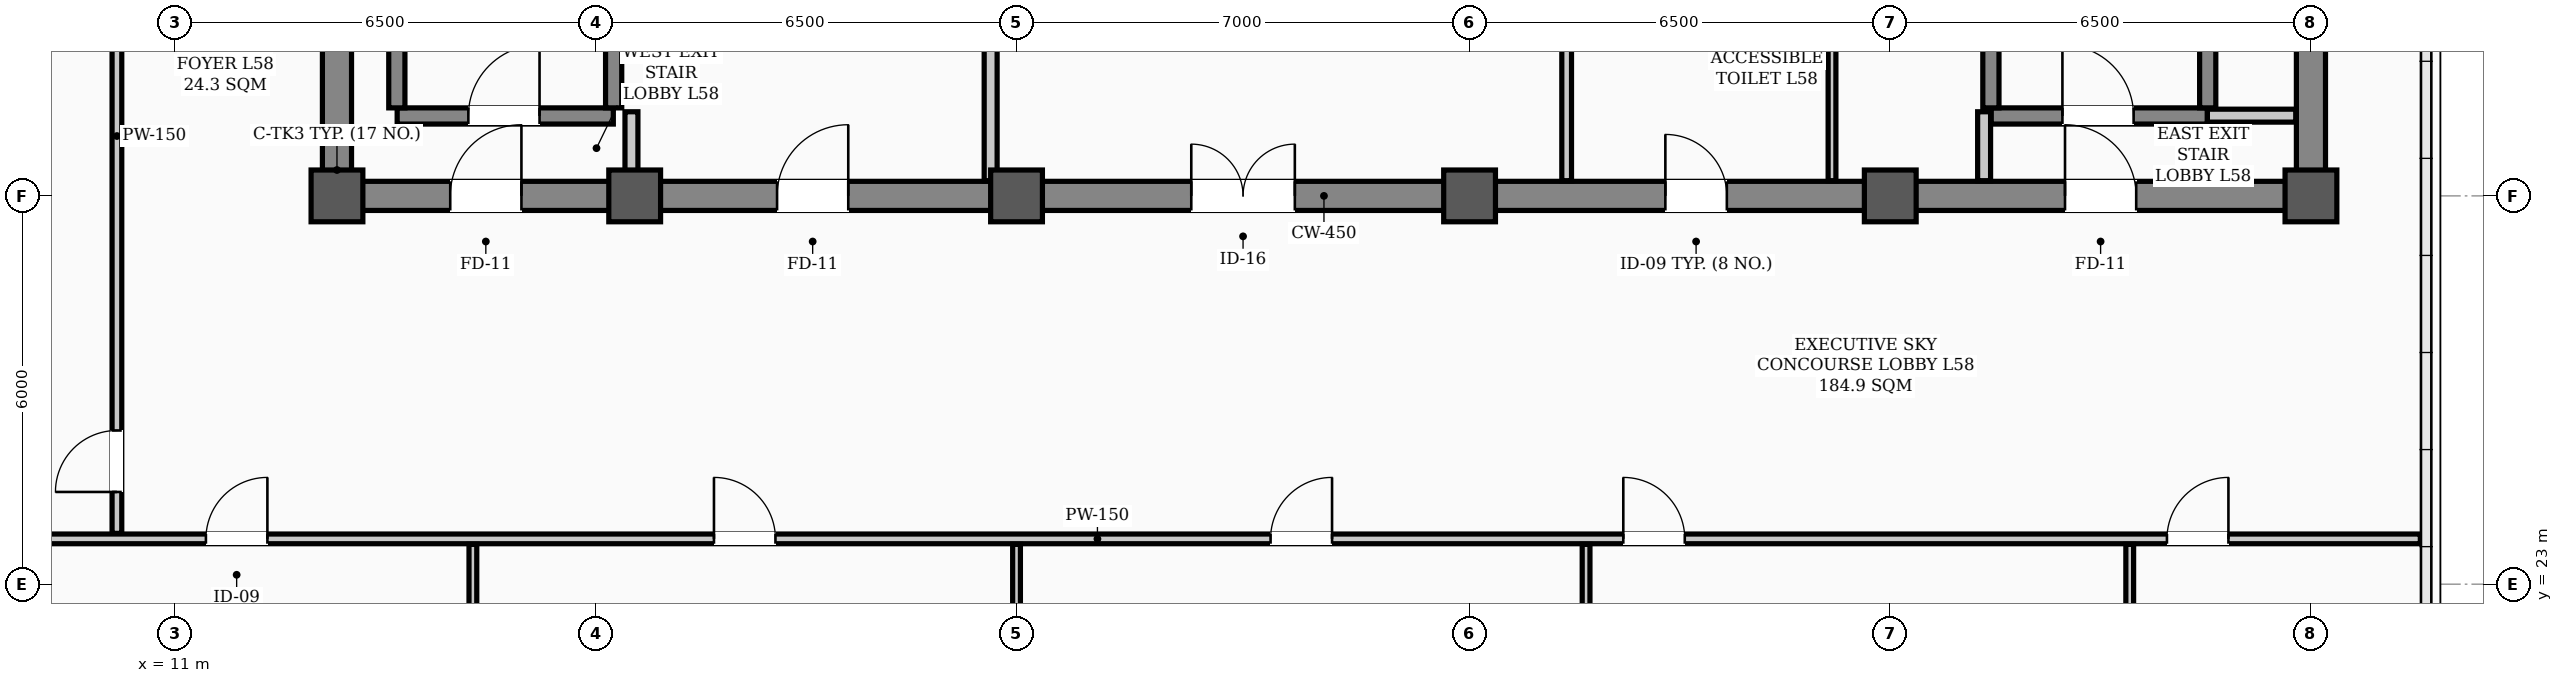
"""IFC4 building model, lengths in metres.
Left out: names, types, materials, properties, quantities, classifications, styles, units other than length and angle.
Written with IfcOpenShell. Run it as: python <this file> out.ifc"""

import sys

from ifc_helpers import new_model, si_unit, direction, frame, frame_2d, origin, origin_2d, place, context, subcontext, project, spatial, rectangle, hollow_rectangle, extrude, element, fill, save


model = new_model("IFC4")
c1 = context("Model", 3, precision=1e-05, world=origin(), true_north=direction((0.0, 1.0)))
c2 = subcontext(c1, "Body", "Model", "MODEL_VIEW")
j1 = project(units=[si_unit("LENGTHUNIT", "METRE"), si_unit("PLANEANGLEUNIT", "RADIAN")], contexts=[c1])
p1 = place(None, origin())
s1 = spatial("IfcSite", under=j1, at=p1, CompositionType="ELEMENT")
p2 = place(p1, origin())
s2 = spatial("IfcBuilding", under=s1, at=p2, CompositionType="ELEMENT")
p3 = place(p2, frame((0.0, 0.0, 234.5)))
s3 = spatial("IfcBuildingStorey", under=s2, at=p3, CompositionType="ELEMENT", Elevation=234.5)
for number, where, z_axis, x_axis in (
    (1, (13.5, 29.0, 0.0), (0.0, 0.0, 1.0), (1.0, 0.0, 0.0)),
    (2, (18.1, 29.0, 0.0), (0.0, 0.0, 1.0), (1.0, 0.0, 0.0)),
    (3, (24.0, 29.0, 0.0), (0.0, 0.0, 1.0), (1.0, 0.0, 0.0)),
    (4, (31.0, 29.0, 0.0), (0.0, 0.0, 1.0), (1.0, 0.0, 0.0)),
    (5, (37.5, 29.0, 0.0), (0.0, 0.0, 1.0), (1.0, 0.0, 0.0)),
    (6, (44.0, 29.0, 0.0), (0.0, 0.0, 1.0), (1.0, 0.0, 0.0)),
):
    element("IfcColumn", number, at=place(p3, frame(where, z_axis=z_axis, x_axis=x_axis)), inside=s3, PredefinedType="COLUMN", context=c2, shape_type="SweptSolid", body=[
        extrude(hollow_rectangle(XDim=0.8, YDim=0.8, WallThickness=0.032, InnerFilletRadius=0.016, OuterFilletRadius=0.048, at=origin_2d()), origin(), (0.0, 0.0, 1.0), 3.9),
    ])
p4 = place(p3, frame((13.5, 29.0, 0.0), z_axis=(0.0, 0.0, 1.0), x_axis=(1.0, 0.0, 0.0)))
e7 = element("IfcWall", 7, at=p4, inside=s3, PredefinedType="SHEAR", context=c2, shape_type="SweptSolid", body=[
    extrude(rectangle(XDim=30.5, YDim=0.45, at=frame_2d((15.25, 0.0))), origin(), (0.0, 0.0, 1.0), 3.72),
])
p5 = place(p4, frame((1.75, 0.0, 0.0)))
e8 = element("IfcOpeningElement", 8, at=p5, cuts=e7, PredefinedType="OPENING", context=c2, shape_type="SweptSolid", body=[
    extrude(rectangle(XDim=1.1, YDim=2.08, at=frame_2d((0.55, 1.04))), frame((0.0, 0.235, 0.0), z_axis=(0.0, -1.0, 0.0), x_axis=(1.0, 0.0, 0.0)), (0.0, 0.0, 1.0), 0.47),
])
p6 = place(p4, frame((26.7, 0.0, 0.0)))
e9 = element("IfcOpeningElement", 9, at=p6, cuts=e7, PredefinedType="OPENING", context=c2, shape_type="SweptSolid", body=[
    extrude(rectangle(XDim=1.1, YDim=2.08, at=frame_2d((0.55, 1.04))), frame((0.0, 0.235, 0.0), z_axis=(0.0, -1.0, 0.0), x_axis=(1.0, 0.0, 0.0)), (0.0, 0.0, 1.0), 0.47),
])
p7 = place(p4, frame((6.8, 0.0, 0.0)))
e10 = element("IfcOpeningElement", 10, at=p7, cuts=e7, PredefinedType="OPENING", context=c2, shape_type="SweptSolid", body=[
    extrude(rectangle(XDim=1.1, YDim=2.08, at=frame_2d((0.55, 1.04))), frame((0.0, 0.235, 0.0), z_axis=(0.0, -1.0, 0.0), x_axis=(1.0, 0.0, 0.0)), (0.0, 0.0, 1.0), 0.47),
])
p8 = place(p4, frame((13.2, 0.0, 0.0)))
e11 = element("IfcOpeningElement", 11, at=p8, cuts=e7, PredefinedType="OPENING", context=c2, shape_type="SweptSolid", body=[
    extrude(rectangle(XDim=1.6, YDim=2.08, at=frame_2d((0.8, 1.04))), frame((0.0, 0.235, 0.0), z_axis=(0.0, -1.0, 0.0), x_axis=(1.0, 0.0, 0.0)), (0.0, 0.0, 1.0), 0.47),
])
p9 = place(p4, frame((20.525, 0.0, 0.0)))
e12 = element("IfcOpeningElement", 12, at=p9, cuts=e7, PredefinedType="OPENING", context=c2, shape_type="SweptSolid", body=[
    extrude(rectangle(XDim=0.95, YDim=2.08, at=frame_2d((0.475, 1.04))), frame((0.0, 0.235, 0.0), z_axis=(0.0, -1.0, 0.0), x_axis=(1.0, 0.0, 0.0)), (0.0, 0.0, 1.0), 0.47),
])
for number, where, z_axis, x_axis in (
    (13, (13.5, 29.35, 0.0), (0.0, 0.0, 1.0), (0.0, 1.0, 0.0)),
    (14, (44.0, 29.35, 0.0), (0.0, 0.0, 1.0), (0.0, 1.0, 0.0)),
):
    element("IfcWall", number, at=place(p3, frame(where, z_axis=z_axis, x_axis=x_axis)), inside=s3, PredefinedType="SHEAR", context=c2, shape_type="SweptSolid", body=[
        extrude(rectangle(XDim=8.6, YDim=0.45, at=frame_2d((4.3, 0.0))), origin(), (0.0, 0.0, 1.0), 3.72),
    ])
p10 = place(p3, frame((14.43, 30.235, 0.0), z_axis=(0.0, 0.0, 1.0), x_axis=(1.0, 0.0, 0.0)))
e15 = element("IfcWall", 15, at=p10, inside=s3, PredefinedType="STANDARD", context=c2, shape_type="SweptSolid", body=[
    extrude(rectangle(XDim=3.34, YDim=0.25, at=frame_2d((1.67, 0.0))), origin(), (0.0, 0.0, 1.0), 3.72),
])
p11 = place(p10, frame((1.1, 0.0, 0.0)))
e16 = element("IfcOpeningElement", 16, at=p11, cuts=e15, PredefinedType="OPENING", context=c2, shape_type="SweptSolid", body=[
    extrude(rectangle(XDim=1.1, YDim=2.08, at=frame_2d((0.55, 1.04))), frame((0.0, 0.135, 0.0), z_axis=(0.0, -1.0, 0.0), x_axis=(1.0, 0.0, 0.0)), (0.0, 0.0, 1.0), 0.27),
])
for number, where, z_axis, x_axis in (
    (17, (14.425, 30.36, 0.0), (0.0, 0.0, 1.0), (0.0, 1.0, 0.0)),
    (18, (17.775, 30.36, 0.0), (0.0, 0.0, 1.0), (0.0, 1.0, 0.0)),
):
    element("IfcWall", number, at=place(p3, frame(where, z_axis=z_axis, x_axis=x_axis)), inside=s3, PredefinedType="STANDARD", context=c2, shape_type="SweptSolid", body=[
        extrude(rectangle(XDim=7.184, YDim=0.25, at=frame_2d((3.592, 0.0))), origin(), (0.0, 0.0, 1.0), 3.72),
    ])
p12 = place(p3, frame((39.06, 30.235, 0.0), z_axis=(0.0, 0.0, 1.0), x_axis=(1.0, 0.0, 0.0)))
e19 = element("IfcWall", 19, at=p12, inside=s3, PredefinedType="STANDARD", context=c2, shape_type="SweptSolid", body=[
    extrude(rectangle(XDim=3.34, YDim=0.25, at=frame_2d((1.67, 0.0))), origin(), (0.0, 0.0, 1.0), 3.72),
])
p13 = place(p12, frame((1.1, 0.0, 0.0)))
e20 = element("IfcOpeningElement", 20, at=p13, cuts=e19, PredefinedType="OPENING", context=c2, shape_type="SweptSolid", body=[
    extrude(rectangle(XDim=1.1, YDim=2.08, at=frame_2d((0.55, 1.04))), frame((0.0, 0.135, 0.0), z_axis=(0.0, -1.0, 0.0), x_axis=(1.0, 0.0, 0.0)), (0.0, 0.0, 1.0), 0.27),
])
for number, where, z_axis, x_axis in (
    (21, (39.055, 30.36, 0.0), (0.0, 0.0, 1.0), (0.0, 1.0, 0.0)),
    (22, (42.405, 30.36, 0.0), (0.0, 0.0, 1.0), (0.0, 1.0, 0.0)),
):
    element("IfcWall", number, at=place(p3, frame(where, z_axis=z_axis, x_axis=x_axis)), inside=s3, PredefinedType="STANDARD", context=c2, shape_type="SweptSolid", body=[
        extrude(rectangle(XDim=7.184, YDim=0.25, at=frame_2d((3.592, 0.0))), origin(), (0.0, 0.0, 1.0), 3.72),
    ])
p14 = place(p3, frame((42.4, 30.24, 0.0), z_axis=(0.0, 0.0, 1.0), x_axis=(1.0, 0.0, 0.0)))
e23 = element("IfcWall", 23, at=p14, inside=s3, PredefinedType="STANDARD", context=c2, shape_type="SweptSolid", body=[
    extrude(rectangle(XDim=1.365, YDim=0.2, at=frame_2d((0.683, 0.0))), origin(), (0.0, 0.0, 1.0), 3.72),
])
p15 = place(p3, frame((4.81, 23.7, 0.0), z_axis=(0.0, 0.0, 1.0), x_axis=(1.0, 0.0, 0.0)))
e24 = element("IfcWall", 24, at=p15, inside=s3, PredefinedType="PARTITIONING", context=c2, shape_type="SweptSolid", body=[
    extrude(rectangle(XDim=40.88, YDim=0.15, at=frame_2d((20.44, 0.0))), origin(), (0.0, 0.0, 1.0), 3.2),
])
p16 = place(p15, frame((6.665, 0.0, 0.0)))
e25 = element("IfcOpeningElement", 25, at=p16, cuts=e24, PredefinedType="OPENING", context=c2, shape_type="SweptSolid", body=[
    extrude(rectangle(XDim=0.95, YDim=2.08, at=frame_2d((0.475, 1.04))), frame((0.0, 0.085, 0.0), z_axis=(0.0, -1.0, 0.0), x_axis=(1.0, 0.0, 0.0)), (0.0, 0.0, 1.0), 0.17),
])
p17 = place(p15, frame((14.515, 0.0, 0.0)))
e26 = element("IfcOpeningElement", 26, at=p17, cuts=e24, PredefinedType="OPENING", context=c2, shape_type="SweptSolid", body=[
    extrude(rectangle(XDim=0.95, YDim=2.08, at=frame_2d((0.475, 1.04))), frame((0.0, 0.085, 0.0), z_axis=(0.0, -1.0, 0.0), x_axis=(1.0, 0.0, 0.0)), (0.0, 0.0, 1.0), 0.17),
])
p18 = place(p15, frame((23.115, 0.0, 0.0)))
e27 = element("IfcOpeningElement", 27, at=p18, cuts=e24, PredefinedType="OPENING", context=c2, shape_type="SweptSolid", body=[
    extrude(rectangle(XDim=0.95, YDim=2.08, at=frame_2d((0.475, 1.04))), frame((0.0, 0.085, 0.0), z_axis=(0.0, -1.0, 0.0), x_axis=(1.0, 0.0, 0.0)), (0.0, 0.0, 1.0), 0.17),
])
p19 = place(p15, frame((28.565, 0.0, 0.0)))
e28 = element("IfcOpeningElement", 28, at=p19, cuts=e24, PredefinedType="OPENING", context=c2, shape_type="SweptSolid", body=[
    extrude(rectangle(XDim=0.95, YDim=2.08, at=frame_2d((0.475, 1.04))), frame((0.0, 0.085, 0.0), z_axis=(0.0, -1.0, 0.0), x_axis=(1.0, 0.0, 0.0)), (0.0, 0.0, 1.0), 0.17),
])
p20 = place(p15, frame((36.965, 0.0, 0.0)))
e29 = element("IfcOpeningElement", 29, at=p20, cuts=e24, PredefinedType="OPENING", context=c2, shape_type="SweptSolid", body=[
    extrude(rectangle(XDim=0.95, YDim=2.08, at=frame_2d((0.475, 1.04))), frame((0.0, 0.085, 0.0), z_axis=(0.0, -1.0, 0.0), x_axis=(1.0, 0.0, 0.0)), (0.0, 0.0, 1.0), 0.17),
])
p21 = place(p3, frame((18.05, 29.235, 0.0), z_axis=(0.0, 0.0, 1.0), x_axis=(0.0, 1.0, 0.0)))
e30 = element("IfcWall", 30, at=p21, inside=s3, PredefinedType="STANDARD", context=c2, shape_type="SweptSolid", body=[
    extrude(rectangle(XDim=1.065, YDim=0.2, at=frame_2d((0.532, 0.0))), origin(), (0.0, 0.0, 1.0), 3.35),
])
p22 = place(p3, frame((38.95, 29.235, 0.0), z_axis=(0.0, 0.0, 1.0), x_axis=(0.0, 1.0, 0.0)))
e31 = element("IfcWall", 31, at=p22, inside=s3, PredefinedType="STANDARD", context=c2, shape_type="SweptSolid", body=[
    extrude(rectangle(XDim=1.065, YDim=0.2, at=frame_2d((0.532, 0.0))), origin(), (0.0, 0.0, 1.0), 3.72),
])
p23 = place(p3, frame((23.6, 29.235, 0.0), z_axis=(0.0, 0.0, 1.0), x_axis=(0.0, 1.0, 0.0)))
e32 = element("IfcWall", 32, at=p23, inside=s3, PredefinedType="STANDARD", context=c2, shape_type="SweptSolid", body=[
    extrude(rectangle(XDim=5.465, YDim=0.2, at=frame_2d((2.732, 0.0))), origin(), (0.0, 0.0, 1.0), 3.2),
])
p24 = place(p3, frame((32.5, 29.235, 0.0), z_axis=(0.0, 0.0, 1.0), x_axis=(0.0, 1.0, 0.0)))
e33 = element("IfcWall", 33, at=p24, inside=s3, PredefinedType="PARTITIONING", context=c2, shape_type="SweptSolid", body=[
    extrude(rectangle(XDim=2.53, YDim=0.15, at=frame_2d((1.265, 0.0))), origin(), (0.0, 0.0, 1.0), 3.35),
])
p25 = place(p3, frame((36.6, 29.235, 0.0), z_axis=(0.0, 0.0, 1.0), x_axis=(0.0, 1.0, 0.0)))
e34 = element("IfcWall", 34, at=p25, inside=s3, PredefinedType="PARTITIONING", context=c2, shape_type="SweptSolid", body=[
    extrude(rectangle(XDim=2.53, YDim=0.12, at=frame_2d((1.265, 0.0))), origin(), (0.0, 0.0, 1.0), 3.35),
])
p26 = place(p3, frame((10.1, 23.785, 0.0), z_axis=(0.0, 0.0, 1.0), x_axis=(0.0, 1.0, 0.0)))
e35 = element("IfcWall", 35, at=p26, inside=s3, PredefinedType="PARTITIONING", context=c2, shape_type="SweptSolid", body=[
    extrude(rectangle(XDim=12.28, YDim=0.15, at=frame_2d((6.14, 0.0))), origin(), (0.0, 0.0, 1.0), 3.1),
])
p27 = place(p26, frame((0.64, 0.0, 0.0)))
e36 = element("IfcOpeningElement", 36, at=p27, cuts=e35, PredefinedType="OPENING", context=c2, shape_type="SweptSolid", body=[
    extrude(rectangle(XDim=0.95, YDim=2.08, at=frame_2d((0.475, 1.04))), frame((0.0, 0.085, 0.0), z_axis=(0.0, -1.0, 0.0), x_axis=(1.0, 0.0, 0.0)), (0.0, 0.0, 1.0), 0.17),
])
p28 = place(p26, frame((9.815, 0.0, 0.0)))
e37 = element("IfcOpeningElement", 37, at=p28, cuts=e35, PredefinedType="OPENING", context=c2, shape_type="SweptSolid", body=[
    extrude(rectangle(XDim=0.95, YDim=2.08, at=frame_2d((0.475, 1.04))), frame((0.0, 0.085, 0.0), z_axis=(0.0, -1.0, 0.0), x_axis=(1.0, 0.0, 0.0)), (0.0, 0.0, 1.0), 0.17),
])
p29 = place(p3, frame((15.6, 12.41, 0.0), z_axis=(0.0, 0.0, 1.0), x_axis=(0.0, 1.0, 0.0)))
e38 = element("IfcWall", 38, at=p29, inside=s3, PredefinedType="PARTITIONING", context=c2, shape_type="SweptSolid", body=[
    extrude(rectangle(XDim=11.205, YDim=0.12, at=frame_2d((5.603, 0.0))), origin(), (0.0, 0.0, 1.0), 3.1),
])
p30 = place(p3, frame((24.0, 14.17, 0.0), z_axis=(0.0, 0.0, 1.0), x_axis=(0.0, 1.0, 0.0)))
e39 = element("IfcWall", 39, at=p30, inside=s3, PredefinedType="PARTITIONING", context=c2, shape_type="SweptSolid", body=[
    extrude(rectangle(XDim=9.445, YDim=0.12, at=frame_2d((4.723, 0.0))), origin(), (0.0, 0.0, 1.0), 3.1),
])
p31 = place(p3, frame((32.8, 12.41, 0.0), z_axis=(0.0, 0.0, 1.0), x_axis=(0.0, 1.0, 0.0)))
e40 = element("IfcWall", 40, at=p31, inside=s3, PredefinedType="PARTITIONING", context=c2, shape_type="SweptSolid", body=[
    extrude(rectangle(XDim=11.205, YDim=0.12, at=frame_2d((5.603, 0.0))), origin(), (0.0, 0.0, 1.0), 3.1),
])
p32 = place(p3, frame((41.2, 12.41, 0.0), z_axis=(0.0, 0.0, 1.0), x_axis=(0.0, 1.0, 0.0)))
e41 = element("IfcWall", 41, at=p32, inside=s3, PredefinedType="PARTITIONING", context=c2, shape_type="SweptSolid", body=[
    extrude(rectangle(XDim=11.205, YDim=0.12, at=frame_2d((5.603, 0.0))), origin(), (0.0, 0.0, 1.0), 3.72),
])
p33 = place(p11, origin())
e42 = element("IfcDoor", 42, at=p33, inside=s3, OperationType="SINGLE_SWING_RIGHT", PredefinedType="DOOR", context=c2, shape_type="SweptSolid", body=[
    extrude(rectangle(XDim=1.1, YDim=2.08, at=frame_2d((0.55, 1.04))), frame((0.0, 0.025, 0.0), z_axis=(0.0, -1.0, 0.0), x_axis=(1.0, 0.0, 0.0)), (0.0, 0.0, 1.0), 0.05),
])
fill(e16, e42)
p34 = place(p13, origin())
e43 = element("IfcDoor", 43, at=p34, inside=s3, OperationType="SINGLE_SWING_LEFT", PredefinedType="DOOR", context=c2, shape_type="SweptSolid", body=[
    extrude(rectangle(XDim=1.1, YDim=2.08, at=frame_2d((0.55, 1.04))), frame((0.0, 0.025, 0.0), z_axis=(0.0, -1.0, 0.0), x_axis=(1.0, 0.0, 0.0)), (0.0, 0.0, 1.0), 0.05),
])
fill(e20, e43)
p35 = place(p5, origin())
e44 = element("IfcDoor", 44, at=p35, inside=s3, OperationType="SINGLE_SWING_RIGHT", PredefinedType="DOOR", context=c2, shape_type="SweptSolid", body=[
    extrude(rectangle(XDim=1.1, YDim=2.08, at=frame_2d((0.55, 1.04))), frame((0.0, 0.025, 0.0), z_axis=(0.0, -1.0, 0.0), x_axis=(1.0, 0.0, 0.0)), (0.0, 0.0, 1.0), 0.05),
])
fill(e8, e44)
p36 = place(p6, origin())
e45 = element("IfcDoor", 45, at=p36, inside=s3, OperationType="SINGLE_SWING_LEFT", PredefinedType="DOOR", context=c2, shape_type="SweptSolid", body=[
    extrude(rectangle(XDim=1.1, YDim=2.08, at=frame_2d((0.55, 1.04))), frame((0.0, 0.025, 0.0), z_axis=(0.0, -1.0, 0.0), x_axis=(1.0, 0.0, 0.0)), (0.0, 0.0, 1.0), 0.05),
])
fill(e9, e45)
p37 = place(p7, origin())
e46 = element("IfcDoor", 46, at=p37, inside=s3, OperationType="SINGLE_SWING_RIGHT", PredefinedType="DOOR", context=c2, shape_type="SweptSolid", body=[
    extrude(rectangle(XDim=1.1, YDim=2.08, at=frame_2d((0.55, 1.04))), frame((0.0, 0.025, 0.0), z_axis=(0.0, -1.0, 0.0), x_axis=(1.0, 0.0, 0.0)), (0.0, 0.0, 1.0), 0.05),
])
fill(e10, e46)
p38 = place(p8, origin())
e47 = element("IfcDoor", 47, at=p38, inside=s3, OperationType="DOUBLE_DOOR_SINGLE_SWING", PredefinedType="DOOR", context=c2, shape_type="SweptSolid", body=[
    extrude(rectangle(XDim=1.6, YDim=2.08, at=frame_2d((0.8, 1.04))), frame((0.0, 0.025, 0.0), z_axis=(0.0, -1.0, 0.0), x_axis=(1.0, 0.0, 0.0)), (0.0, 0.0, 1.0), 0.05),
])
fill(e11, e47)
p39 = place(p9, origin())
e48 = element("IfcDoor", 48, at=p39, inside=s3, OperationType="SINGLE_SWING_LEFT", PredefinedType="DOOR", context=c2, shape_type="SweptSolid", body=[
    extrude(rectangle(XDim=0.95, YDim=2.08, at=frame_2d((0.475, 1.04))), frame((0.0, 0.025, 0.0), z_axis=(0.0, -1.0, 0.0), x_axis=(1.0, 0.0, 0.0)), (0.0, 0.0, 1.0), 0.05),
])
fill(e12, e48)
p40 = place(p16, origin())
e49 = element("IfcDoor", 49, at=p40, inside=s3, OperationType="SINGLE_SWING_RIGHT", PredefinedType="DOOR", context=c2, shape_type="SweptSolid", body=[
    extrude(rectangle(XDim=0.95, YDim=2.08, at=frame_2d((0.475, 1.04))), frame((0.0, 0.025, 0.0), z_axis=(0.0, -1.0, 0.0), x_axis=(1.0, 0.0, 0.0)), (0.0, 0.0, 1.0), 0.05),
])
fill(e25, e49)
p41 = place(p17, origin())
e50 = element("IfcDoor", 50, at=p41, inside=s3, OperationType="SINGLE_SWING_LEFT", PredefinedType="DOOR", context=c2, shape_type="SweptSolid", body=[
    extrude(rectangle(XDim=0.95, YDim=2.08, at=frame_2d((0.475, 1.04))), frame((0.0, 0.025, 0.0), z_axis=(0.0, -1.0, 0.0), x_axis=(1.0, 0.0, 0.0)), (0.0, 0.0, 1.0), 0.05),
])
fill(e26, e50)
p42 = place(p18, origin())
e51 = element("IfcDoor", 51, at=p42, inside=s3, OperationType="SINGLE_SWING_RIGHT", PredefinedType="DOOR", context=c2, shape_type="SweptSolid", body=[
    extrude(rectangle(XDim=0.95, YDim=2.08, at=frame_2d((0.475, 1.04))), frame((0.0, 0.025, 0.0), z_axis=(0.0, -1.0, 0.0), x_axis=(1.0, 0.0, 0.0)), (0.0, 0.0, 1.0), 0.05),
])
fill(e27, e51)
p43 = place(p19, origin())
e52 = element("IfcDoor", 52, at=p43, inside=s3, OperationType="SINGLE_SWING_LEFT", PredefinedType="DOOR", context=c2, shape_type="SweptSolid", body=[
    extrude(rectangle(XDim=0.95, YDim=2.08, at=frame_2d((0.475, 1.04))), frame((0.0, 0.025, 0.0), z_axis=(0.0, -1.0, 0.0), x_axis=(1.0, 0.0, 0.0)), (0.0, 0.0, 1.0), 0.05),
])
fill(e28, e52)
p44 = place(p20, origin())
e53 = element("IfcDoor", 53, at=p44, inside=s3, OperationType="SINGLE_SWING_RIGHT", PredefinedType="DOOR", context=c2, shape_type="SweptSolid", body=[
    extrude(rectangle(XDim=0.95, YDim=2.08, at=frame_2d((0.475, 1.04))), frame((0.0, 0.025, 0.0), z_axis=(0.0, -1.0, 0.0), x_axis=(1.0, 0.0, 0.0)), (0.0, 0.0, 1.0), 0.05),
])
fill(e29, e53)
p45 = place(p27, origin())
e54 = element("IfcDoor", 54, at=p45, inside=s3, OperationType="SINGLE_SWING_LEFT", PredefinedType="DOOR", context=c2, shape_type="SweptSolid", body=[
    extrude(rectangle(XDim=0.95, YDim=2.08, at=frame_2d((0.475, 1.04))), frame((0.0, 0.025, 0.0), z_axis=(0.0, -1.0, 0.0), x_axis=(1.0, 0.0, 0.0)), (0.0, 0.0, 1.0), 0.05),
])
fill(e36, e54)
save(model, sys.argv[1])
